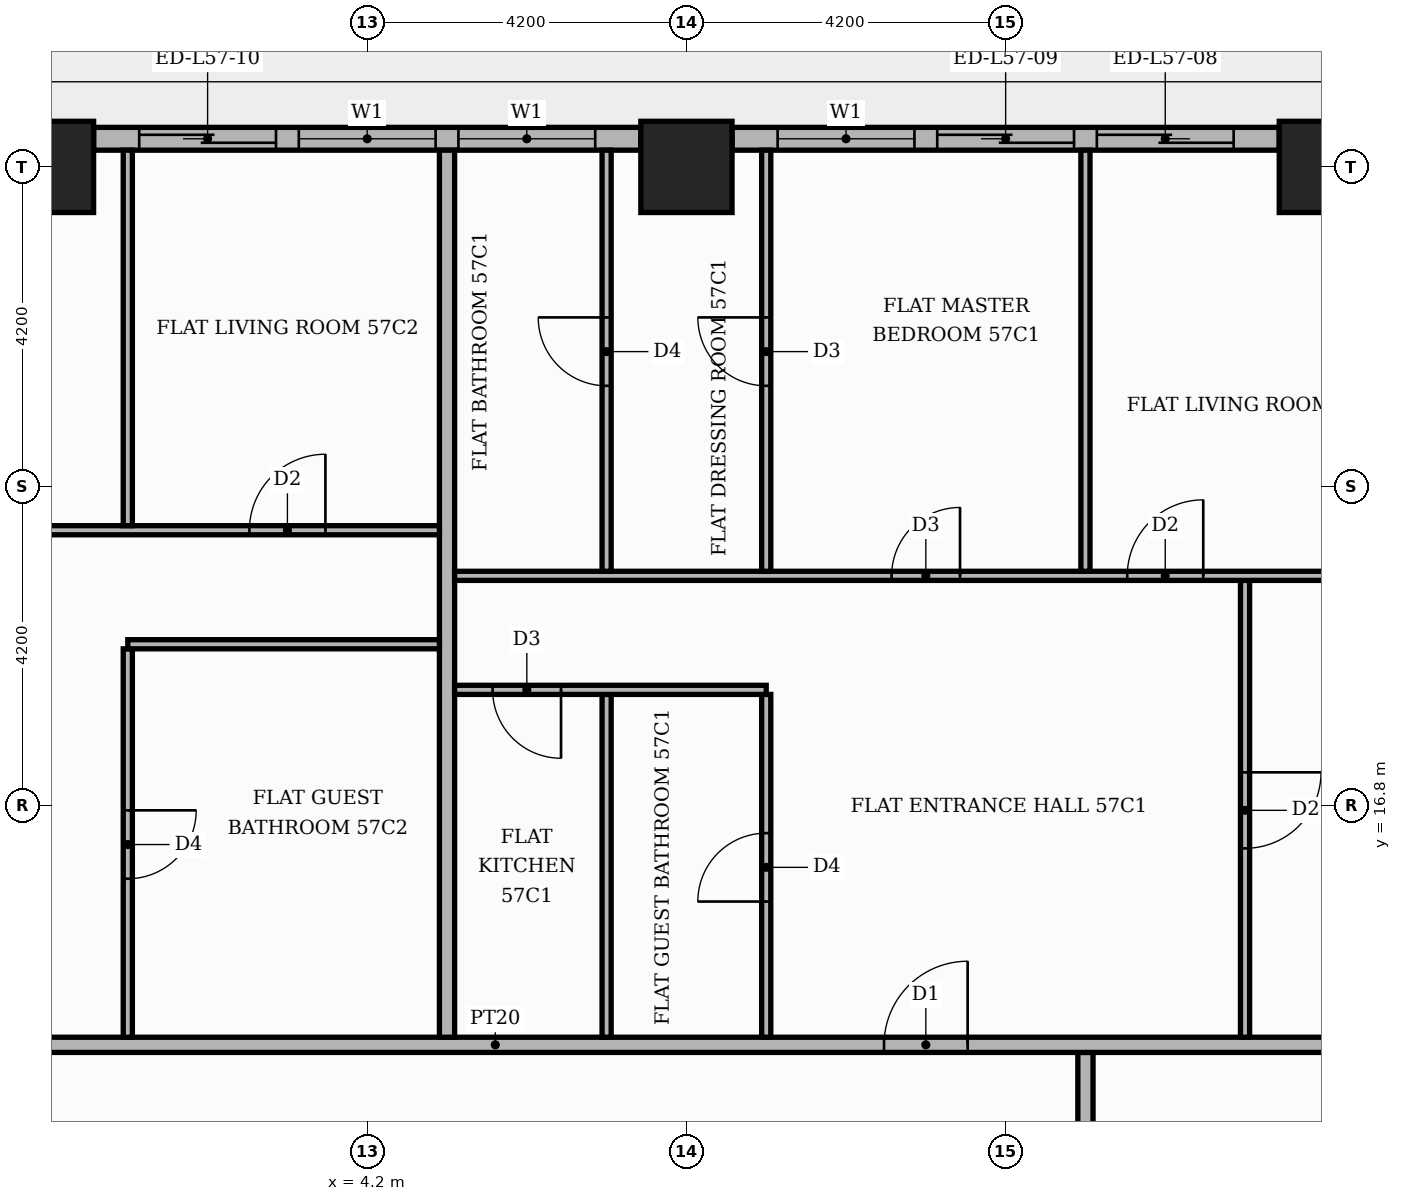
"""IFC4 building model, lengths in metres.
Left out: names, types, materials, properties, quantities, classifications, styles, units other than length and angle.
Written with IfcOpenShell. Run it as: python <this file> out.ifc"""

import sys

from ifc_helpers import new_model, si_unit, direction, frame, frame_2d, origin, origin_2d, place, context, subcontext, project, spatial, rectangle, extrude, element, fill, save


model = new_model("IFC4")
c1 = context("Model", 3, precision=1e-05, world=origin(), true_north=direction((0.0, 1.0)))
c2 = subcontext(c1, "Body", "Model", "MODEL_VIEW")
j1 = project(units=[si_unit("LENGTHUNIT", "METRE"), si_unit("PLANEANGLEUNIT", "RADIAN")], contexts=[c1])
p1 = place(None, origin())
s1 = spatial("IfcSite", under=j1, at=p1, CompositionType="ELEMENT")
p2 = place(p1, origin())
s2 = spatial("IfcBuilding", under=s1, at=p2, CompositionType="ELEMENT")
p3 = place(p2, frame((0.0, 0.0, 240.6)))
s3 = spatial("IfcBuildingStorey", under=s2, at=p3, CompositionType="ELEMENT", Elevation=240.6)
for number, where, z_axis, x_axis in (
    (1, (0.0, 25.2, 0.0), (0.0, 0.0, 1.0), (1.0, 0.0, 0.0)),
    (2, (8.4, 25.2, 0.0), (0.0, 0.0, 1.0), (1.0, 0.0, 0.0)),
    (3, (16.8, 25.2, 0.0), (0.0, 0.0, 1.0), (1.0, 0.0, 0.0)),
):
    element("IfcColumn", number, at=place(p3, frame(where, z_axis=z_axis, x_axis=x_axis)), inside=s3, PredefinedType="COLUMN", context=c2, shape_type="SweptSolid", body=[
        extrude(rectangle(XDim=1.2, YDim=1.2, at=origin_2d()), origin(), (0.0, 0.0, 1.0), 3.9),
    ])
p4 = place(p3, frame((16.2, 25.57, 0.0), z_axis=(0.0, 0.0, 1.0), x_axis=(-1.0, 0.0, 0.0)))
e4 = element("IfcWall", 4, at=p4, inside=s3, PredefinedType="STANDARD", context=c2, shape_type="SweptSolid", body=[
    extrude(rectangle(XDim=7.2, YDim=0.3, at=frame_2d((3.6, 0.0))), origin(), (0.0, 0.0, 1.0), 3.48),
])
p5 = place(p4, frame((0.6, 0.0, 0.0)))
e5 = element("IfcOpeningElement", 5, at=p5, cuts=e4, PredefinedType="OPENING", context=c2, shape_type="SweptSolid", body=[
    extrude(rectangle(XDim=1.8, YDim=2.4, at=frame_2d((0.9, 1.2))), frame((0.0, 0.16, 0.0), z_axis=(0.0, -1.0, 0.0), x_axis=(1.0, 0.0, 0.0)), (0.0, 0.0, 1.0), 0.32),
])
p6 = place(p4, frame((2.7, 0.0, 0.0)))
e6 = element("IfcOpeningElement", 6, at=p6, cuts=e4, PredefinedType="OPENING", context=c2, shape_type="SweptSolid", body=[
    extrude(rectangle(XDim=1.8, YDim=2.4, at=frame_2d((0.9, 1.2))), frame((0.0, 0.16, 0.0), z_axis=(0.0, -1.0, 0.0), x_axis=(1.0, 0.0, 0.0)), (0.0, 0.0, 1.0), 0.32),
])
p7 = place(p4, frame((4.8, 0.0, 0.9)))
e7 = element("IfcOpeningElement", 7, at=p7, cuts=e4, PredefinedType="OPENING", context=c2, shape_type="SweptSolid", body=[
    extrude(rectangle(XDim=1.8, YDim=2.1, at=frame_2d((0.9, 1.05))), frame((0.0, 0.16, 0.0), z_axis=(0.0, -1.0, 0.0), x_axis=(1.0, 0.0, 0.0)), (0.0, 0.0, 1.0), 0.32),
])
p8 = place(p3, frame((7.8, 25.57, 0.0), z_axis=(0.0, 0.0, 1.0), x_axis=(-1.0, 0.0, 0.0)))
e8 = element("IfcWall", 8, at=p8, inside=s3, PredefinedType="STANDARD", context=c2, shape_type="SweptSolid", body=[
    extrude(rectangle(XDim=7.2, YDim=0.3, at=frame_2d((3.6, 0.0))), origin(), (0.0, 0.0, 1.0), 3.48),
])
p9 = place(p8, frame((0.6, 0.0, 0.9)))
e9 = element("IfcOpeningElement", 9, at=p9, cuts=e8, PredefinedType="OPENING", context=c2, shape_type="SweptSolid", body=[
    extrude(rectangle(XDim=1.8, YDim=2.1, at=frame_2d((0.9, 1.05))), frame((0.0, 0.16, 0.0), z_axis=(0.0, -1.0, 0.0), x_axis=(1.0, 0.0, 0.0)), (0.0, 0.0, 1.0), 0.32),
])
p10 = place(p8, frame((2.7, 0.0, 0.9)))
e10 = element("IfcOpeningElement", 10, at=p10, cuts=e8, PredefinedType="OPENING", context=c2, shape_type="SweptSolid", body=[
    extrude(rectangle(XDim=1.8, YDim=2.1, at=frame_2d((0.9, 1.05))), frame((0.0, 0.16, 0.0), z_axis=(0.0, -1.0, 0.0), x_axis=(1.0, 0.0, 0.0)), (0.0, 0.0, 1.0), 0.32),
])
p11 = place(p8, frame((4.8, 0.0, 0.0)))
e11 = element("IfcOpeningElement", 11, at=p11, cuts=e8, PredefinedType="OPENING", context=c2, shape_type="SweptSolid", body=[
    extrude(rectangle(XDim=1.8, YDim=2.4, at=frame_2d((0.9, 1.2))), frame((0.0, 0.16, 0.0), z_axis=(0.0, -1.0, 0.0), x_axis=(1.0, 0.0, 0.0)), (0.0, 0.0, 1.0), 0.32),
])
p12 = place(p3, frame((13.65, 11.1, 0.0), z_axis=(0.0, 0.0, 1.0), x_axis=(0.0, 1.0, 0.0)))
e12 = element("IfcWall", 12, at=p12, inside=s3, PredefinedType="PARTITIONING", context=c2, shape_type="SweptSolid", body=[
    extrude(rectangle(XDim=2.45, YDim=0.2, at=frame_2d((1.225, 0.0))), origin(), (0.0, 0.0, 1.0), 3.48),
])
p13 = place(p3, frame((-13.65, 13.65, 0.0), z_axis=(0.0, 0.0, 1.0), x_axis=(1.0, 0.0, 0.0)))
e13 = element("IfcWall", 13, at=p13, inside=s3, PredefinedType="PARTITIONING", context=c2, shape_type="SweptSolid", body=[
    extrude(rectangle(XDim=39.07, YDim=0.2, at=frame_2d((19.535, 0.0))), origin(), (0.0, 0.0, 1.0), 3.48),
])
p14 = place(p13, frame((24.65, 0.0, 0.0)))
e14 = element("IfcOpeningElement", 14, at=p14, cuts=e13, PredefinedType="OPENING", context=c2, shape_type="SweptSolid", body=[
    extrude(rectangle(XDim=1.1, YDim=2.4, at=frame_2d((0.55, 1.2))), frame((0.0, 0.11, 0.0), z_axis=(0.0, -1.0, 0.0), x_axis=(1.0, 0.0, 0.0)), (0.0, 0.0, 1.0), 0.22),
])
p15 = place(p13, frame((12.05, 0.0, 0.0)))
e15 = element("IfcOpeningElement", 15, at=p15, cuts=e13, PredefinedType="OPENING", context=c2, shape_type="SweptSolid", body=[
    extrude(rectangle(XDim=1.1, YDim=2.4, at=frame_2d((0.55, 1.2))), frame((0.0, 0.11, 0.0), z_axis=(0.0, -1.0, 0.0), x_axis=(1.0, 0.0, 0.0)), (0.0, 0.0, 1.0), 0.22),
])
p16 = place(p3, frame((1.05, 13.75, 0.0), z_axis=(0.0, 0.0, 1.0), x_axis=(0.0, 1.0, 0.0)))
e16 = element("IfcWall", 16, at=p16, inside=s3, PredefinedType="PARTITIONING", context=c2, shape_type="SweptSolid", body=[
    extrude(rectangle(XDim=5.11, YDim=0.12, at=frame_2d((2.555, 0.0))), origin(), (0.0, 0.0, 1.0), 3.48),
])
p17 = place(p16, frame((2.085, 0.0, 0.0)))
e17 = element("IfcOpeningElement", 17, at=p17, cuts=e16, PredefinedType="OPENING", context=c2, shape_type="SweptSolid", body=[
    extrude(rectangle(XDim=0.9, YDim=2.1, at=frame_2d((0.45, 1.05))), frame((0.0, 0.07, 0.0), z_axis=(0.0, -1.0, 0.0), x_axis=(1.0, 0.0, 0.0)), (0.0, 0.0, 1.0), 0.14),
])
p18 = place(p3, frame((5.25, 13.75, 0.0), z_axis=(0.0, 0.0, 1.0), x_axis=(0.0, 1.0, 0.0)))
e18 = element("IfcWall", 18, at=p18, inside=s3, PredefinedType="PARTITIONING", context=c2, shape_type="SweptSolid", body=[
    extrude(rectangle(XDim=11.67, YDim=0.2, at=frame_2d((5.835, 0.0))), origin(), (0.0, 0.0, 1.0), 3.48),
])
p19 = place(p3, frame((7.35, 13.75, 0.0), z_axis=(0.0, 0.0, 1.0), x_axis=(0.0, 1.0, 0.0)))
e19 = element("IfcWall", 19, at=p19, inside=s3, PredefinedType="PARTITIONING", context=c2, shape_type="SweptSolid", body=[
    extrude(rectangle(XDim=4.51, YDim=0.12, at=frame_2d((2.255, 0.0))), origin(), (0.0, 0.0, 1.0), 3.48),
])
p20 = place(p3, frame((9.45, 13.75, 0.0), z_axis=(0.0, 0.0, 1.0), x_axis=(0.0, 1.0, 0.0)))
e20 = element("IfcWall", 20, at=p20, inside=s3, PredefinedType="PARTITIONING", context=c2, shape_type="SweptSolid", body=[
    extrude(rectangle(XDim=4.51, YDim=0.12, at=frame_2d((2.255, 0.0))), origin(), (0.0, 0.0, 1.0), 3.48),
])
p21 = place(p20, frame((1.785, 0.0, 0.0)))
e21 = element("IfcOpeningElement", 21, at=p21, cuts=e20, PredefinedType="OPENING", context=c2, shape_type="SweptSolid", body=[
    extrude(rectangle(XDim=0.9, YDim=2.1, at=frame_2d((0.45, 1.05))), frame((0.0, 0.07, 0.0), z_axis=(0.0, -1.0, 0.0), x_axis=(1.0, 0.0, 0.0)), (0.0, 0.0, 1.0), 0.14),
])
p22 = place(p3, frame((15.75, 13.75, 0.0), z_axis=(0.0, 0.0, 1.0), x_axis=(0.0, 1.0, 0.0)))
e22 = element("IfcWall", 22, at=p22, inside=s3, PredefinedType="PARTITIONING", context=c2, shape_type="SweptSolid", body=[
    extrude(rectangle(XDim=6.01, YDim=0.12, at=frame_2d((3.005, 0.0))), origin(), (0.0, 0.0, 1.0), 3.48),
])
p23 = place(p22, frame((2.485, 0.0, 0.0)))
e23 = element("IfcOpeningElement", 23, at=p23, cuts=e22, PredefinedType="OPENING", context=c2, shape_type="SweptSolid", body=[
    extrude(rectangle(XDim=1.0, YDim=2.1, at=frame_2d((0.5, 1.05))), frame((0.0, 0.07, 0.0), z_axis=(0.0, -1.0, 0.0), x_axis=(1.0, 0.0, 0.0)), (0.0, 0.0, 1.0), 0.14),
])
p24 = place(p3, frame((5.35, 18.32, 0.0), z_axis=(0.0, 0.0, 1.0), x_axis=(1.0, 0.0, 0.0)))
e24 = element("IfcWall", 24, at=p24, inside=s3, PredefinedType="PARTITIONING", context=c2, shape_type="SweptSolid", body=[
    extrude(rectangle(XDim=4.1, YDim=0.12, at=frame_2d((2.05, 0.0))), origin(), (0.0, 0.0, 1.0), 3.48),
])
p25 = place(p24, frame((0.5, 0.0, 0.0)))
e25 = element("IfcOpeningElement", 25, at=p25, cuts=e24, PredefinedType="OPENING", context=c2, shape_type="SweptSolid", body=[
    extrude(rectangle(XDim=0.9, YDim=2.1, at=frame_2d((0.45, 1.05))), frame((0.0, 0.07, 0.0), z_axis=(0.0, -1.0, 0.0), x_axis=(1.0, 0.0, 0.0)), (0.0, 0.0, 1.0), 0.14),
])
p26 = place(p3, frame((1.05, 18.92, 0.0), z_axis=(0.0, 0.0, 1.0), x_axis=(1.0, 0.0, 0.0)))
e26 = element("IfcWall", 26, at=p26, inside=s3, PredefinedType="PARTITIONING", context=c2, shape_type="SweptSolid", body=[
    extrude(rectangle(XDim=4.1, YDim=0.12, at=frame_2d((2.05, 0.0))), origin(), (0.0, 0.0, 1.0), 3.48),
])
p27 = place(p3, frame((5.35, 19.82, 0.0), z_axis=(0.0, 0.0, 1.0), x_axis=(1.0, 0.0, 0.0)))
e27 = element("IfcWall", 27, at=p27, inside=s3, PredefinedType="PARTITIONING", context=c2, shape_type="SweptSolid", body=[
    extrude(rectangle(XDim=12.35, YDim=0.12, at=frame_2d((6.175, 0.0))), origin(), (0.0, 0.0, 1.0), 3.48),
])
p28 = place(p27, frame((8.85, 0.0, 0.0)))
e28 = element("IfcOpeningElement", 28, at=p28, cuts=e27, PredefinedType="OPENING", context=c2, shape_type="SweptSolid", body=[
    extrude(rectangle(XDim=1.0, YDim=2.1, at=frame_2d((0.5, 1.05))), frame((0.0, 0.07, 0.0), z_axis=(0.0, -1.0, 0.0), x_axis=(1.0, 0.0, 0.0)), (0.0, 0.0, 1.0), 0.14),
])
p29 = place(p27, frame((5.75, 0.0, 0.0)))
e29 = element("IfcOpeningElement", 29, at=p29, cuts=e27, PredefinedType="OPENING", context=c2, shape_type="SweptSolid", body=[
    extrude(rectangle(XDim=0.9, YDim=2.1, at=frame_2d((0.45, 1.05))), frame((0.0, 0.07, 0.0), z_axis=(0.0, -1.0, 0.0), x_axis=(1.0, 0.0, 0.0)), (0.0, 0.0, 1.0), 0.14),
])
p30 = place(p3, frame((7.35, 19.88, 0.0), z_axis=(0.0, 0.0, 1.0), x_axis=(0.0, 1.0, 0.0)))
e30 = element("IfcWall", 30, at=p30, inside=s3, PredefinedType="PARTITIONING", context=c2, shape_type="SweptSolid", body=[
    extrude(rectangle(XDim=5.54, YDim=0.12, at=frame_2d((2.77, 0.0))), origin(), (0.0, 0.0, 1.0), 3.48),
])
p31 = place(p30, frame((2.44, 0.0, 0.0)))
e31 = element("IfcOpeningElement", 31, at=p31, cuts=e30, PredefinedType="OPENING", context=c2, shape_type="SweptSolid", body=[
    extrude(rectangle(XDim=0.9, YDim=2.1, at=frame_2d((0.45, 1.05))), frame((0.0, 0.07, 0.0), z_axis=(0.0, -1.0, 0.0), x_axis=(1.0, 0.0, 0.0)), (0.0, 0.0, 1.0), 0.14),
])
p32 = place(p3, frame((9.45, 19.88, 0.0), z_axis=(0.0, 0.0, 1.0), x_axis=(0.0, 1.0, 0.0)))
e32 = element("IfcWall", 32, at=p32, inside=s3, PredefinedType="PARTITIONING", context=c2, shape_type="SweptSolid", body=[
    extrude(rectangle(XDim=5.54, YDim=0.12, at=frame_2d((2.77, 0.0))), origin(), (0.0, 0.0, 1.0), 3.48),
])
p33 = place(p32, frame((2.44, 0.0, 0.0)))
e33 = element("IfcOpeningElement", 33, at=p33, cuts=e32, PredefinedType="OPENING", context=c2, shape_type="SweptSolid", body=[
    extrude(rectangle(XDim=0.9, YDim=2.1, at=frame_2d((0.45, 1.05))), frame((0.0, 0.07, 0.0), z_axis=(0.0, -1.0, 0.0), x_axis=(1.0, 0.0, 0.0)), (0.0, 0.0, 1.0), 0.14),
])
p34 = place(p3, frame((13.65, 19.88, 0.0), z_axis=(0.0, 0.0, 1.0), x_axis=(0.0, 1.0, 0.0)))
e34 = element("IfcWall", 34, at=p34, inside=s3, PredefinedType="PARTITIONING", context=c2, shape_type="SweptSolid", body=[
    extrude(rectangle(XDim=5.54, YDim=0.12, at=frame_2d((2.77, 0.0))), origin(), (0.0, 0.0, 1.0), 3.48),
])
p35 = place(p3, frame((-13.55, 20.42, 0.0), z_axis=(0.0, 0.0, 1.0), x_axis=(1.0, 0.0, 0.0)))
e35 = element("IfcWall", 35, at=p35, inside=s3, PredefinedType="PARTITIONING", context=c2, shape_type="SweptSolid", body=[
    extrude(rectangle(XDim=18.7, YDim=0.12, at=frame_2d((9.35, 0.0))), origin(), (0.0, 0.0, 1.0), 3.48),
])
p36 = place(p35, frame((16.2, 0.0, 0.0)))
e36 = element("IfcOpeningElement", 36, at=p36, cuts=e35, PredefinedType="OPENING", context=c2, shape_type="SweptSolid", body=[
    extrude(rectangle(XDim=1.0, YDim=2.1, at=frame_2d((0.5, 1.05))), frame((0.0, 0.07, 0.0), z_axis=(0.0, -1.0, 0.0), x_axis=(1.0, 0.0, 0.0)), (0.0, 0.0, 1.0), 0.14),
])
p37 = place(p35, frame((12.05, 0.0, 0.0)))
e37 = element("IfcOpeningElement", 37, at=p37, cuts=e35, PredefinedType="OPENING", context=c2, shape_type="SweptSolid", body=[
    extrude(rectangle(XDim=0.9, YDim=2.1, at=frame_2d((0.45, 1.05))), frame((0.0, 0.07, 0.0), z_axis=(0.0, -1.0, 0.0), x_axis=(1.0, 0.0, 0.0)), (0.0, 0.0, 1.0), 0.14),
])
p38 = place(p35, frame((3.65, 0.0, 0.0)))
e38 = element("IfcOpeningElement", 38, at=p38, cuts=e35, PredefinedType="OPENING", context=c2, shape_type="SweptSolid", body=[
    extrude(rectangle(XDim=0.9, YDim=2.1, at=frame_2d((0.45, 1.05))), frame((0.0, 0.07, 0.0), z_axis=(0.0, -1.0, 0.0), x_axis=(1.0, 0.0, 0.0)), (0.0, 0.0, 1.0), 0.14),
])
p39 = place(p3, frame((1.05, 20.48, 0.0), z_axis=(0.0, 0.0, 1.0), x_axis=(0.0, 1.0, 0.0)))
e39 = element("IfcWall", 39, at=p39, inside=s3, PredefinedType="PARTITIONING", context=c2, shape_type="SweptSolid", body=[
    extrude(rectangle(XDim=4.94, YDim=0.12, at=frame_2d((2.47, 0.0))), origin(), (0.0, 0.0, 1.0), 3.48),
])
p40 = place(p5, origin())
e40 = element("IfcDoor", 40, at=p40, inside=s3, OperationType="SLIDING_TO_LEFT", PredefinedType="DOOR", context=c2, shape_type="SweptSolid", body=[
    extrude(rectangle(XDim=1.8, YDim=2.4, at=frame_2d((0.9, 1.2))), frame((0.0, 0.025, 0.0), z_axis=(0.0, -1.0, 0.0), x_axis=(1.0, 0.0, 0.0)), (0.0, 0.0, 1.0), 0.05),
])
fill(e5, e40)
p41 = place(p6, origin())
e41 = element("IfcDoor", 41, at=p41, inside=s3, OperationType="SLIDING_TO_RIGHT", PredefinedType="DOOR", context=c2, shape_type="SweptSolid", body=[
    extrude(rectangle(XDim=1.8, YDim=2.4, at=frame_2d((0.9, 1.2))), frame((0.0, 0.025, 0.0), z_axis=(0.0, -1.0, 0.0), x_axis=(1.0, 0.0, 0.0)), (0.0, 0.0, 1.0), 0.05),
])
fill(e6, e41)
p42 = place(p7, origin())
e42 = element("IfcWindow", 42, at=p42, inside=s3, PartitioningType="SINGLE_PANEL", PredefinedType="WINDOW", context=c2, shape_type="SweptSolid", body=[
    extrude(rectangle(XDim=1.8, YDim=2.1, at=frame_2d((0.9, 1.05))), frame((0.0, 0.03, 0.0), z_axis=(0.0, -1.0, 0.0), x_axis=(1.0, 0.0, 0.0)), (0.0, 0.0, 1.0), 0.06),
])
fill(e7, e42)
p43 = place(p9, origin())
e43 = element("IfcWindow", 43, at=p43, inside=s3, PartitioningType="SINGLE_PANEL", PredefinedType="WINDOW", context=c2, shape_type="SweptSolid", body=[
    extrude(rectangle(XDim=1.8, YDim=2.1, at=frame_2d((0.9, 1.05))), frame((0.0, 0.03, 0.0), z_axis=(0.0, -1.0, 0.0), x_axis=(1.0, 0.0, 0.0)), (0.0, 0.0, 1.0), 0.06),
])
fill(e9, e43)
p44 = place(p10, origin())
e44 = element("IfcWindow", 44, at=p44, inside=s3, PartitioningType="SINGLE_PANEL", PredefinedType="WINDOW", context=c2, shape_type="SweptSolid", body=[
    extrude(rectangle(XDim=1.8, YDim=2.1, at=frame_2d((0.9, 1.05))), frame((0.0, 0.03, 0.0), z_axis=(0.0, -1.0, 0.0), x_axis=(1.0, 0.0, 0.0)), (0.0, 0.0, 1.0), 0.06),
])
fill(e10, e44)
p45 = place(p11, origin())
e45 = element("IfcDoor", 45, at=p45, inside=s3, OperationType="SLIDING_TO_RIGHT", PredefinedType="DOOR", context=c2, shape_type="SweptSolid", body=[
    extrude(rectangle(XDim=1.8, YDim=2.4, at=frame_2d((0.9, 1.2))), frame((0.0, 0.025, 0.0), z_axis=(0.0, -1.0, 0.0), x_axis=(1.0, 0.0, 0.0)), (0.0, 0.0, 1.0), 0.05),
])
fill(e11, e45)
p46 = place(p14, origin())
e46 = element("IfcDoor", 46, at=p46, inside=s3, OperationType="SINGLE_SWING_RIGHT", PredefinedType="DOOR", context=c2, shape_type="SweptSolid", body=[
    extrude(rectangle(XDim=1.1, YDim=2.4, at=frame_2d((0.55, 1.2))), frame((0.0, 0.025, 0.0), z_axis=(0.0, -1.0, 0.0), x_axis=(1.0, 0.0, 0.0)), (0.0, 0.0, 1.0), 0.05),
])
fill(e14, e46)
p47 = place(p23, frame((1.0, 0.0, 0.0), z_axis=(0.0, 0.0, 1.0), x_axis=(-1.0, 0.0, 0.0)))
e47 = element("IfcDoor", 47, at=p47, inside=s3, OperationType="SINGLE_SWING_RIGHT", PredefinedType="DOOR", context=c2, shape_type="SweptSolid", body=[
    extrude(rectangle(XDim=1.0, YDim=2.1, at=frame_2d((0.5, 1.05))), frame((0.0, 0.025, 0.0), z_axis=(0.0, -1.0, 0.0), x_axis=(1.0, 0.0, 0.0)), (0.0, 0.0, 1.0), 0.05),
])
fill(e23, e47)
p48 = place(p21, origin())
e48 = element("IfcDoor", 48, at=p48, inside=s3, OperationType="SINGLE_SWING_LEFT", PredefinedType="DOOR", context=c2, shape_type="SweptSolid", body=[
    extrude(rectangle(XDim=0.9, YDim=2.1, at=frame_2d((0.45, 1.05))), frame((0.0, 0.025, 0.0), z_axis=(0.0, -1.0, 0.0), x_axis=(1.0, 0.0, 0.0)), (0.0, 0.0, 1.0), 0.05),
])
fill(e21, e48)
p49 = place(p25, frame((0.9, 0.0, 0.0), z_axis=(0.0, 0.0, 1.0), x_axis=(-1.0, 0.0, 0.0)))
e49 = element("IfcDoor", 49, at=p49, inside=s3, OperationType="SINGLE_SWING_RIGHT", PredefinedType="DOOR", context=c2, shape_type="SweptSolid", body=[
    extrude(rectangle(XDim=0.9, YDim=2.1, at=frame_2d((0.45, 1.05))), frame((0.0, 0.025, 0.0), z_axis=(0.0, -1.0, 0.0), x_axis=(1.0, 0.0, 0.0)), (0.0, 0.0, 1.0), 0.05),
])
fill(e25, e49)
p50 = place(p28, origin())
e50 = element("IfcDoor", 50, at=p50, inside=s3, OperationType="SINGLE_SWING_RIGHT", PredefinedType="DOOR", context=c2, shape_type="SweptSolid", body=[
    extrude(rectangle(XDim=1.0, YDim=2.1, at=frame_2d((0.5, 1.05))), frame((0.0, 0.025, 0.0), z_axis=(0.0, -1.0, 0.0), x_axis=(1.0, 0.0, 0.0)), (0.0, 0.0, 1.0), 0.05),
])
fill(e28, e50)
p51 = place(p29, origin())
e51 = element("IfcDoor", 51, at=p51, inside=s3, OperationType="SINGLE_SWING_RIGHT", PredefinedType="DOOR", context=c2, shape_type="SweptSolid", body=[
    extrude(rectangle(XDim=0.9, YDim=2.1, at=frame_2d((0.45, 1.05))), frame((0.0, 0.025, 0.0), z_axis=(0.0, -1.0, 0.0), x_axis=(1.0, 0.0, 0.0)), (0.0, 0.0, 1.0), 0.05),
])
fill(e29, e51)
p52 = place(p33, origin())
e52 = element("IfcDoor", 52, at=p52, inside=s3, OperationType="SINGLE_SWING_RIGHT", PredefinedType="DOOR", context=c2, shape_type="SweptSolid", body=[
    extrude(rectangle(XDim=0.9, YDim=2.1, at=frame_2d((0.45, 1.05))), frame((0.0, 0.025, 0.0), z_axis=(0.0, -1.0, 0.0), x_axis=(1.0, 0.0, 0.0)), (0.0, 0.0, 1.0), 0.05),
])
fill(e33, e52)
p53 = place(p31, origin())
e53 = element("IfcDoor", 53, at=p53, inside=s3, OperationType="SINGLE_SWING_RIGHT", PredefinedType="DOOR", context=c2, shape_type="SweptSolid", body=[
    extrude(rectangle(XDim=0.9, YDim=2.1, at=frame_2d((0.45, 1.05))), frame((0.0, 0.025, 0.0), z_axis=(0.0, -1.0, 0.0), x_axis=(1.0, 0.0, 0.0)), (0.0, 0.0, 1.0), 0.05),
])
fill(e31, e53)
p54 = place(p17, frame((0.9, 0.0, 0.0), z_axis=(0.0, 0.0, 1.0), x_axis=(-1.0, 0.0, 0.0)))
e54 = element("IfcDoor", 54, at=p54, inside=s3, OperationType="SINGLE_SWING_RIGHT", PredefinedType="DOOR", context=c2, shape_type="SweptSolid", body=[
    extrude(rectangle(XDim=0.9, YDim=2.1, at=frame_2d((0.45, 1.05))), frame((0.0, 0.025, 0.0), z_axis=(0.0, -1.0, 0.0), x_axis=(1.0, 0.0, 0.0)), (0.0, 0.0, 1.0), 0.05),
])
fill(e17, e54)
p55 = place(p36, origin())
e55 = element("IfcDoor", 55, at=p55, inside=s3, OperationType="SINGLE_SWING_RIGHT", PredefinedType="DOOR", context=c2, shape_type="SweptSolid", body=[
    extrude(rectangle(XDim=1.0, YDim=2.1, at=frame_2d((0.5, 1.05))), frame((0.0, 0.025, 0.0), z_axis=(0.0, -1.0, 0.0), x_axis=(1.0, 0.0, 0.0)), (0.0, 0.0, 1.0), 0.05),
])
fill(e36, e55)
save(model, sys.argv[1])
